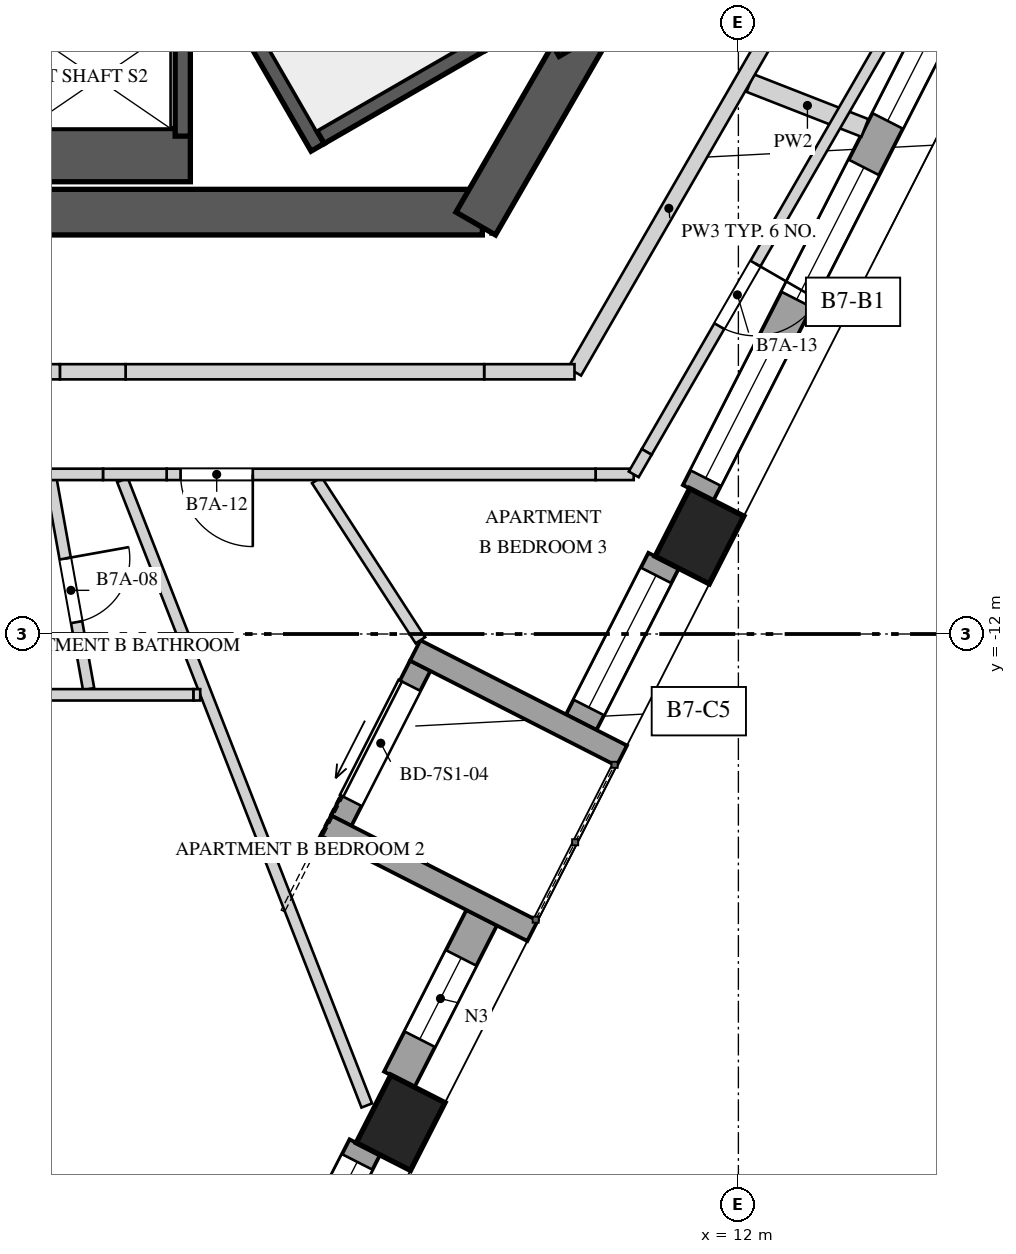
"""IFC4 building model, lengths in metres.
Left out: names, types, materials, properties, quantities, classifications, styles, units other than length and angle.
Written with IfcOpenShell. Run it as: python <this file> out.ifc"""

import sys

from ifc_helpers import new_model, si_unit, direction, frame, frame_2d, origin, origin_2d, place, context, subcontext, project, spatial, rectangle, extrude, element, fill, save


model = new_model("IFC4")
c1 = context("Model", 3, precision=1e-05, world=origin(), true_north=direction((0.0, 1.0)))
c2 = subcontext(c1, "Body", "Model", "MODEL_VIEW")
j1 = project(units=[si_unit("LENGTHUNIT", "METRE"), si_unit("PLANEANGLEUNIT", "RADIAN")], contexts=[c1])
p1 = place(None, origin())
s1 = spatial("IfcSite", under=j1, at=p1, CompositionType="ELEMENT")
p2 = place(p1, origin())
s2 = spatial("IfcBuilding", under=s1, at=p2, CompositionType="ELEMENT")
p3 = place(p2, frame((0.0, 0.0, 274.4)))
s3 = spatial("IfcBuildingStorey", under=s2, at=p3, CompositionType="ELEMENT", Elevation=274.4)
p4 = place(p3, frame((-8.631, -6.45, 0.0), z_axis=(0.0, 0.0, 1.0), x_axis=(1.0, 0.0, 0.0)))
e1 = element("IfcWall", 1, at=p4, inside=s3, PredefinedType="SHEAR", context=c2, shape_type="SweptSolid", body=[
    extrude(rectangle(XDim=17.263, YDim=0.6, at=frame_2d((8.631, 0.0))), origin(), (0.0, 0.0, 1.0), 4.0),
])
p5 = place(p4, frame((6.836, 0.0, 0.0)))
e2 = element("IfcOpeningElement", 2, at=p5, cuts=e1, PredefinedType="OPENING", context=c2, shape_type="SweptSolid", body=[
    extrude(rectangle(XDim=1.0, YDim=2.4, at=frame_2d((0.5, 1.2))), frame((0.0, 0.31, 0.0), z_axis=(0.0, -1.0, 0.0), x_axis=(1.0, 0.0, 0.0)), (0.0, 0.0, 1.0), 0.62),
])
p6 = place(p3, frame((8.545, -6.6, 0.0), z_axis=(0.0, 0.0, 1.0), x_axis=(0.499995765644, 0.866027848477, 0.0)))
e3 = element("IfcWall", 3, at=p6, inside=s3, PredefinedType="SHEAR", context=c2, shape_type="SweptSolid", body=[
    extrude(rectangle(XDim=2.887, YDim=0.6, at=frame_2d((1.443, 0.0))), origin(), (0.0, 0.0, 1.0), 4.0),
])
p7 = place(p3, frame((9.902, -4.25, 0.0), z_axis=(0.0, 0.0, 1.0), x_axis=(-0.499999536116, 0.866025671608, 0.0)))
e4 = element("IfcWall", 4, at=p7, inside=s3, PredefinedType="SHEAR", context=c2, shape_type="SweptSolid", body=[
    extrude(rectangle(XDim=17.263, YDim=0.6, at=frame_2d((8.631, 0.0))), origin(), (0.0, 0.0, 1.0), 4.0),
])
p8 = place(p7, frame((6.906, 0.0, 0.0)))
e5 = element("IfcOpeningElement", 5, at=p8, cuts=e4, PredefinedType="OPENING", context=c2, shape_type="SweptSolid", body=[
    extrude(rectangle(XDim=1.0, YDim=2.4, at=frame_2d((0.5, 1.2))), frame((0.0, 0.31, 0.0), z_axis=(0.0, -1.0, 0.0), x_axis=(1.0, 0.0, 0.0)), (0.0, 0.0, 1.0), 0.62),
])
for number, where, z_axis, x_axis in (
    (6, (7.557, -18.43, -0.35), (0.0, 0.0, 1.0), (0.454, 0.891, 0.0)),
    (7, (11.488, -10.713, -0.35), (0.0, 0.0, 1.0), (0.454, 0.891, 0.0)),
):
    element("IfcColumn", number, at=place(p3, frame(where, z_axis=z_axis, x_axis=x_axis)), inside=s3, PredefinedType="COLUMN", context=c2, shape_type="SweptSolid", body=[
        extrude(rectangle(XDim=1.0, YDim=0.8, at=origin_2d()), origin(), (0.0, 0.0, 1.0), 4.35),
    ])
p9 = place(p3, frame((3.879, -25.041, 0.0), z_axis=(0.0, 0.0, 1.0), x_axis=(0.453992084912, 0.891005716501, 0.0)))
e8 = element("IfcWall", 8, at=p9, inside=s3, PredefinedType="SOLIDWALL", context=c2, shape_type="SweptSolid", body=[
    extrude(rectangle(XDim=7.06, YDim=0.45, at=frame_2d((3.53, 0.0))), origin(), (0.0, 0.0, 1.0), 3.3),
])
p10 = place(p9, frame((0.293, 0.0, 0.4)))
e9 = element("IfcOpeningElement", 9, at=p10, cuts=e8, PredefinedType="OPENING", context=c2, shape_type="SweptSolid", body=[
    extrude(rectangle(XDim=1.2, YDim=2.1, at=frame_2d((0.6, 1.05))), frame((0.0, 0.235, 0.0), z_axis=(0.0, -1.0, 0.0), x_axis=(1.0, 0.0, 0.0)), (0.0, 0.0, 1.0), 0.47),
])
p11 = place(p9, frame((2.255, 0.0, 0.4)))
e10 = element("IfcOpeningElement", 10, at=p11, cuts=e8, PredefinedType="OPENING", context=c2, shape_type="SweptSolid", body=[
    extrude(rectangle(XDim=1.95, YDim=2.75, at=frame_2d((0.975, 1.375))), frame((0.0, 0.235, 0.0), z_axis=(0.0, -1.0, 0.0), x_axis=(1.0, 0.0, 0.0)), (0.0, 0.0, 1.0), 0.47),
])
p12 = place(p9, frame((4.892, 0.0, 0.4)))
e11 = element("IfcOpeningElement", 11, at=p12, cuts=e8, PredefinedType="OPENING", context=c2, shape_type="SweptSolid", body=[
    extrude(rectangle(XDim=1.95, YDim=2.75, at=frame_2d((0.975, 1.375))), frame((0.0, 0.235, 0.0), z_axis=(0.0, -1.0, 0.0), x_axis=(1.0, 0.0, 0.0)), (0.0, 0.0, 1.0), 0.47),
])
p13 = place(p3, frame((7.539, -17.859, 0.0), z_axis=(0.0, 0.0, 1.0), x_axis=(0.454074413722, 0.890963762901, 0.0)))
e12 = element("IfcWall", 12, at=p13, inside=s3, PredefinedType="SOLIDWALL", context=c2, shape_type="SweptSolid", body=[
    extrude(rectangle(XDim=2.387, YDim=0.45, at=frame_2d((1.193, 0.0))), origin(), (0.0, 0.0, 1.0), 3.3),
])
p14 = place(p13, frame((0.593, 0.0, 0.4)))
e13 = element("IfcOpeningElement", 13, at=p14, cuts=e12, PredefinedType="OPENING", context=c2, shape_type="SweptSolid", body=[
    extrude(rectangle(XDim=1.2, YDim=2.75, at=frame_2d((0.6, 1.375))), frame((0.0, 0.235, 0.0), z_axis=(0.0, -1.0, 0.0), x_axis=(1.0, 0.0, 0.0)), (0.0, 0.0, 1.0), 0.47),
])
p15 = place(p3, frame((9.933, -13.161, 0.0), z_axis=(0.0, 0.0, 1.0), x_axis=(0.453993206954, 0.891005144788, 0.0)))
e14 = element("IfcWall", 14, at=p15, inside=s3, PredefinedType="SOLIDWALL", context=c2, shape_type="SweptSolid", body=[
    extrude(rectangle(XDim=2.386, YDim=0.45, at=frame_2d((1.193, 0.0))), origin(), (0.0, 0.0, 1.0), 3.3),
])
p16 = place(p15, frame((0.218, 0.0, 0.4)))
e15 = element("IfcOpeningElement", 15, at=p16, cuts=e14, PredefinedType="OPENING", context=c2, shape_type="SweptSolid", body=[
    extrude(rectangle(XDim=1.95, YDim=2.75, at=frame_2d((0.975, 1.375))), frame((0.0, 0.235, 0.0), z_axis=(0.0, -1.0, 0.0), x_axis=(1.0, 0.0, 0.0)), (0.0, 0.0, 1.0), 0.47),
])
p17 = place(p3, frame((11.47, -10.143, 0.0), z_axis=(0.0, 0.0, 1.0), x_axis=(0.453995484395, 0.891003984362, 0.0)))
e16 = element("IfcWall", 16, at=p17, inside=s3, PredefinedType="SOLIDWALL", context=c2, shape_type="SweptSolid", body=[
    extrude(rectangle(XDim=7.66, YDim=0.45, at=frame_2d((3.83, 0.0))), origin(), (0.0, 0.0, 1.0), 3.3),
])
p18 = place(p17, frame((0.218, 0.0, 0.4)))
e17 = element("IfcOpeningElement", 17, at=p18, cuts=e16, PredefinedType="OPENING", context=c2, shape_type="SweptSolid", body=[
    extrude(rectangle(XDim=1.95, YDim=2.75, at=frame_2d((0.975, 1.375))), frame((0.0, 0.235, 0.0), z_axis=(0.0, -1.0, 0.0), x_axis=(1.0, 0.0, 0.0)), (0.0, 0.0, 1.0), 0.47),
])
p19 = place(p17, frame((2.855, 0.0, 0.4)))
e18 = element("IfcOpeningElement", 18, at=p19, cuts=e16, PredefinedType="OPENING", context=c2, shape_type="SweptSolid", body=[
    extrude(rectangle(XDim=1.95, YDim=2.75, at=frame_2d((0.975, 1.375))), frame((0.0, 0.235, 0.0), z_axis=(0.0, -1.0, 0.0), x_axis=(1.0, 0.0, 0.0)), (0.0, 0.0, 1.0), 0.47),
])
p20 = place(p17, frame((5.492, 0.0, 0.4)))
e19 = element("IfcOpeningElement", 19, at=p20, cuts=e16, PredefinedType="OPENING", context=c2, shape_type="SweptSolid", body=[
    extrude(rectangle(XDim=1.95, YDim=2.75, at=frame_2d((0.975, 1.375))), frame((0.0, 0.235, 0.0), z_axis=(0.0, -1.0, 0.0), x_axis=(1.0, 0.0, 0.0)), (0.0, 0.0, 1.0), 0.47),
])
p21 = place(p3, frame((6.776, -14.455, 0.0), z_axis=(0.0, 0.0, 1.0), x_axis=(0.454076116559, 0.890962895058, 0.0)))
e20 = element("IfcWall", 20, at=p21, inside=s3, PredefinedType="SOLIDWALL", context=c2, shape_type="SweptSolid", body=[
    extrude(rectangle(XDim=2.287, YDim=0.3, at=frame_2d((1.143, 0.0))), origin(), (0.0, 0.0, 1.0), 3.3),
])
p22 = place(p21, frame((0.293, 0.0, 0.0)))
e21 = element("IfcOpeningElement", 21, at=p22, cuts=e20, PredefinedType="OPENING", context=c2, shape_type="SweptSolid", body=[
    extrude(rectangle(XDim=1.7, YDim=2.5, at=frame_2d((0.85, 1.25))), frame((0.0, 0.16, 0.0), z_axis=(0.0, -1.0, 0.0), x_axis=(1.0, 0.0, 0.0)), (0.0, 0.0, 1.0), 0.32),
])
p23 = place(p3, frame((9.292, -15.906, 0.0), z_axis=(0.0, 0.0, 1.0), x_axis=(-0.891023613249, 0.453956959009, 0.0)))
e22 = element("IfcWall", 22, at=p23, inside=s3, PredefinedType="SOLIDWALL", context=c2, shape_type="SweptSolid", body=[
    extrude(rectangle(XDim=3.05, YDim=0.3, at=frame_2d((1.525, 0.0))), origin(), (0.0, 0.0, 1.0), 3.3),
])
p24 = place(p3, frame((10.466, -13.601, 0.0), z_axis=(0.0, 0.0, 1.0), x_axis=(-0.890991233495, 0.454020508165, 0.0)))
e23 = element("IfcWall", 23, at=p24, inside=s3, PredefinedType="SOLIDWALL", context=c2, shape_type="SweptSolid", body=[
    extrude(rectangle(XDim=3.05, YDim=0.3, at=frame_2d((1.525, 0.0))), origin(), (0.0, 0.0, 1.0), 3.3),
])
p25 = place(p3, frame((6.465, -5.597, 0.0), z_axis=(0.0, 0.0, 1.0), x_axis=(-0.49998037582, 0.866036733513, 0.0)))
e24 = element("IfcWall", 24, at=p25, inside=s3, PredefinedType="SOLIDWALL", context=c2, shape_type="SweptSolid", body=[
    extrude(rectangle(XDim=6.2, YDim=0.2, at=frame_2d((3.1, 0.0))), origin(), (0.0, 0.0, 1.0), 3.65),
])
p26 = place(p3, frame((6.501, -5.461, 0.0), z_axis=(0.0, 0.0, 1.0), x_axis=(0.865989465428, 0.500062241894, 0.0)))
e25 = element("IfcWall", 25, at=p26, inside=s3, PredefinedType="SOLIDWALL", context=c2, shape_type="SweptSolid", body=[
    extrude(rectangle(XDim=2.55, YDim=0.2, at=frame_2d((1.275, 0.0))), origin(), (0.0, 0.0, 1.0), 3.65),
])
p27 = place(p3, frame((-0.71, -5.7, 0.0), z_axis=(0.0, 0.0, 1.0), x_axis=(1.0, 0.0, 0.0)))
e26 = element("IfcWall", 26, at=p27, inside=s3, PredefinedType="SOLIDWALL", context=c2, shape_type="SweptSolid", body=[
    extrude(rectangle(XDim=5.5, YDim=0.7, at=frame_2d((2.75, 0.0))), origin(), (0.0, 0.0, 1.0), 3.65),
])
p28 = place(p3, frame((4.69, -3.9, 0.0), z_axis=(0.0, 0.0, 1.0), x_axis=(0.0, -1.0, 0.0)))
e27 = element("IfcWall", 27, at=p28, inside=s3, PredefinedType="SOLIDWALL", context=c2, shape_type="SweptSolid", body=[
    extrude(rectangle(XDim=1.55, YDim=0.2, at=frame_2d((0.775, 0.0))), origin(), (0.0, 0.0, 1.0), 3.65),
])
p29 = place(p3, frame((2.946, -9.905, 0.0), z_axis=(0.0, 0.0, 1.0), x_axis=(0.17664289563, -0.984275005993, 0.0)))
e28 = element("IfcWall", 28, at=p29, inside=s3, PredefinedType="PARTITIONING", context=c2, shape_type="SweptSolid", body=[
    extrude(rectangle(XDim=2.865, YDim=0.15, at=frame_2d((1.433, 0.0))), origin(), (0.0, 0.0, 1.0), 3.65),
])
p30 = place(p29, frame((1.12, 0.0, 0.0)))
e29 = element("IfcOpeningElement", 29, at=p30, cuts=e28, PredefinedType="OPENING", context=c2, shape_type="SweptSolid", body=[
    extrude(rectangle(XDim=0.85, YDim=2.4, at=frame_2d((0.425, 1.2))), frame((0.0, 0.085, 0.0), z_axis=(0.0, -1.0, 0.0), x_axis=(1.0, 0.0, 0.0)), (0.0, 0.0, 1.0), 0.17),
])
p31 = place(p3, frame((3.897, -9.975, 0.0), z_axis=(0.0, 0.0, 1.0), x_axis=(0.363873008582, -0.931448567354, 0.0)))
e30 = element("IfcWall", 30, at=p31, inside=s3, PredefinedType="PARTITIONING", context=c2, shape_type="SweptSolid", body=[
    extrude(rectangle(XDim=8.833, YDim=0.15, at=frame_2d((4.417, 0.0))), origin(), (0.0, 0.0, 1.0), 2.75),
])
p32 = place(p3, frame((4.92, -12.8, 0.0), z_axis=(0.0, 0.0, 1.0), x_axis=(-1.0, 0.0, 0.0)))
e31 = element("IfcWall", 31, at=p32, inside=s3, PredefinedType="PARTITIONING", context=c2, shape_type="SweptSolid", body=[
    extrude(rectangle(XDim=0.09, YDim=0.15, at=frame_2d((0.045, 0.0))), origin(), (0.0, 0.0, 1.0), 2.75),
])
p33 = place(p3, frame((4.83, -12.8, 0.0), z_axis=(0.0, 0.0, 1.0), x_axis=(-1.0, 0.0, 0.0)))
e32 = element("IfcWall", 32, at=p33, inside=s3, PredefinedType="PARTITIONING", context=c2, shape_type="SweptSolid", body=[
    extrude(rectangle(XDim=2.008, YDim=0.15, at=frame_2d((1.004, 0.0))), origin(), (0.0, 0.0, 1.0), 3.65),
])
p34 = place(p3, frame((6.453, -9.975, 0.0), z_axis=(0.0, 0.0, 1.0), x_axis=(0.543154479249, -0.839632783824, 0.0)))
e33 = element("IfcWall", 33, at=p34, inside=s3, PredefinedType="PARTITIONING", context=c2, shape_type="SweptSolid", body=[
    extrude(rectangle(XDim=2.51, YDim=0.15, at=frame_2d((1.255, 0.0))), origin(), (0.0, 0.0, 1.0), 3.65),
])
p35 = place(p3, frame((10.623, -9.9, 0.0), z_axis=(0.0, 0.0, 1.0), x_axis=(-1.0, 0.0, 0.0)))
e34 = element("IfcWall", 34, at=p35, inside=s3, PredefinedType="PARTITIONING", context=c2, shape_type="SweptSolid", body=[
    extrude(rectangle(XDim=0.502, YDim=0.15, at=frame_2d((0.251, 0.0))), origin(), (0.0, 0.0, 1.0), 2.95),
])
p36 = place(p3, frame((10.121, -9.9, 0.0), z_axis=(0.0, 0.0, 1.0), x_axis=(-1.0, 0.0, 0.0)))
e35 = element("IfcWall", 35, at=p36, inside=s3, PredefinedType="PARTITIONING", context=c2, shape_type="SweptSolid", body=[
    extrude(rectangle(XDim=5.643, YDim=0.15, at=frame_2d((2.822, 0.0))), origin(), (0.0, 0.0, 1.0), 3.65),
])
p37 = place(p36, frame((4.51, 0.0, 0.0)))
e36 = element("IfcOpeningElement", 36, at=p37, cuts=e35, PredefinedType="OPENING", context=c2, shape_type="SweptSolid", body=[
    extrude(rectangle(XDim=0.95, YDim=2.4, at=frame_2d((0.475, 1.2))), frame((0.0, 0.085, 0.0), z_axis=(0.0, -1.0, 0.0), x_axis=(1.0, 0.0, 0.0)), (0.0, 0.0, 1.0), 0.17),
])
p38 = place(p3, frame((4.478, -9.9, 0.0), z_axis=(0.0, 0.0, 1.0), x_axis=(-1.0, 0.0, 0.0)))
e37 = element("IfcWall", 37, at=p38, inside=s3, PredefinedType="PARTITIONING", context=c2, shape_type="SweptSolid", body=[
    extrude(rectangle(XDim=0.838, YDim=0.15, at=frame_2d((0.419, 0.0))), origin(), (0.0, 0.0, 1.0), 2.75),
])
p39 = place(p3, frame((3.64, -9.9, 0.0), z_axis=(0.0, 0.0, 1.0), x_axis=(-1.0, 0.0, 0.0)))
e38 = element("IfcWall", 38, at=p39, inside=s3, PredefinedType="PARTITIONING", context=c2, shape_type="SweptSolid", body=[
    extrude(rectangle(XDim=0.691, YDim=0.15, at=frame_2d((0.345, 0.0))), origin(), (0.0, 0.0, 1.0), 3.65),
])
p40 = place(p3, frame((12.153, -4.751, 0.0), z_axis=(0.0, 0.0, 1.0), x_axis=(0.931322658747, -0.364195147283, 0.0)))
e39 = element("IfcWall", 39, at=p40, inside=s3, PredefinedType="SOLIDWALL", context=c2, shape_type="SweptSolid", body=[
    extrude(rectangle(XDim=1.623, YDim=0.25, at=frame_2d((0.812, 0.0))), origin(), (0.0, 0.0, 1.0), 3.65),
])
p41 = place(p3, frame((13.885, -4.25, 0.0), z_axis=(0.0, 0.0, 1.0), x_axis=(-0.500003887042, -0.866023159588, 0.0)))
e40 = element("IfcWall", 40, at=p41, inside=s3, PredefinedType="PARTITIONING", context=c2, shape_type="SweptSolid", body=[
    extrude(rectangle(XDim=6.183, YDim=0.15, at=frame_2d((3.091, 0.0))), origin(), (0.0, 0.0, 1.0), 3.65),
])
p42 = place(p41, frame((3.322, 0.0, 0.0)))
e41 = element("IfcOpeningElement", 41, at=p42, cuts=e40, PredefinedType="OPENING", context=c2, shape_type="SweptSolid", body=[
    extrude(rectangle(XDim=0.95, YDim=2.4, at=frame_2d((0.475, 1.2))), frame((0.0, 0.085, 0.0), z_axis=(0.0, -1.0, 0.0), x_axis=(1.0, 0.0, 0.0)), (0.0, 0.0, 1.0), 0.17),
])
p43 = place(p3, frame((10.794, -9.604, 0.0), z_axis=(0.0, 0.0, 1.0), x_axis=(-0.499908181442, -0.866078408764, 0.0)))
e42 = element("IfcWall", 42, at=p43, inside=s3, PredefinedType="PARTITIONING", context=c2, shape_type="SweptSolid", body=[
    extrude(rectangle(XDim=0.341, YDim=0.15, at=frame_2d((0.171, 0.0))), origin(), (0.0, 0.0, 1.0), 2.95),
])
p44 = place(p3, frame((12.326, -4.25, 0.0), z_axis=(0.0, 0.0, 1.0), x_axis=(-0.50000478328, -0.866022642139, 0.0)))
e43 = element("IfcWall", 43, at=p44, inside=s3, PredefinedType="SOLIDWALL", context=c2, shape_type="SweptSolid", body=[
    extrude(rectangle(XDim=4.965, YDim=0.2, at=frame_2d((2.483, 0.0))), origin(), (0.0, 0.0, 1.0), 3.65),
])
p45 = place(p3, frame((9.844, -8.55, 0.0), z_axis=(0.0, 0.0, 1.0), x_axis=(-1.0, 0.0, 0.0)))
e44 = element("IfcWall", 44, at=p45, inside=s3, PredefinedType="SOLIDWALL", context=c2, shape_type="SweptSolid", body=[
    extrude(rectangle(XDim=1.188, YDim=0.2, at=frame_2d((0.594, 0.0))), origin(), (0.0, 0.0, 1.0), 2.95),
])
p46 = place(p3, frame((8.655, -8.55, 0.0), z_axis=(0.0, 0.0, 1.0), x_axis=(-1.0, 0.0, 0.0)))
e45 = element("IfcWall", 45, at=p46, inside=s3, PredefinedType="SOLIDWALL", context=c2, shape_type="SweptSolid", body=[
    extrude(rectangle(XDim=4.717, YDim=0.2, at=frame_2d((2.359, 0.0))), origin(), (0.0, 0.0, 1.0), 3.65),
])
p47 = place(p3, frame((3.938, -8.55, 0.0), z_axis=(0.0, 0.0, 1.0), x_axis=(-1.0, 0.0, 0.0)))
e46 = element("IfcWall", 46, at=p47, inside=s3, PredefinedType="SOLIDWALL", context=c2, shape_type="SweptSolid", body=[
    extrude(rectangle(XDim=0.865, YDim=0.2, at=frame_2d((0.432, 0.0))), origin(), (0.0, 0.0, 1.0), 2.75),
])
p48 = place(p3, frame((3.073, -8.55, 0.0), z_axis=(0.0, 0.0, 1.0), x_axis=(-1.0, 0.0, 0.0)))
e47 = element("IfcWall", 47, at=p48, inside=s3, PredefinedType="SOLIDWALL", context=c2, shape_type="SweptSolid", body=[
    extrude(rectangle(XDim=0.939, YDim=0.2, at=frame_2d((0.47, 0.0))), origin(), (0.0, 0.0, 1.0), 3.65),
])
p49 = place(p12, origin())
e48 = element("IfcWindow", 48, at=p49, inside=s3, PartitioningType="SINGLE_PANEL", PredefinedType="WINDOW", context=c2, shape_type="SweptSolid", body=[
    extrude(rectangle(XDim=1.95, YDim=2.75, at=frame_2d((0.975, 1.375))), frame((0.0, 0.03, 0.0), z_axis=(0.0, -1.0, 0.0), x_axis=(1.0, 0.0, 0.0)), (0.0, 0.0, 1.0), 0.06),
])
fill(e11, e48)
p50 = place(p14, origin())
e49 = element("IfcWindow", 49, at=p50, inside=s3, PartitioningType="SINGLE_PANEL", PredefinedType="WINDOW", context=c2, shape_type="SweptSolid", body=[
    extrude(rectangle(XDim=1.2, YDim=2.75, at=frame_2d((0.6, 1.375))), frame((0.0, 0.03, 0.0), z_axis=(0.0, -1.0, 0.0), x_axis=(1.0, 0.0, 0.0)), (0.0, 0.0, 1.0), 0.06),
])
fill(e13, e49)
p51 = place(p16, origin())
e50 = element("IfcWindow", 50, at=p51, inside=s3, PartitioningType="SINGLE_PANEL", PredefinedType="WINDOW", context=c2, shape_type="SweptSolid", body=[
    extrude(rectangle(XDim=1.95, YDim=2.75, at=frame_2d((0.975, 1.375))), frame((0.0, 0.03, 0.0), z_axis=(0.0, -1.0, 0.0), x_axis=(1.0, 0.0, 0.0)), (0.0, 0.0, 1.0), 0.06),
])
fill(e15, e50)
p52 = place(p18, origin())
e51 = element("IfcWindow", 51, at=p52, inside=s3, PartitioningType="SINGLE_PANEL", PredefinedType="WINDOW", context=c2, shape_type="SweptSolid", body=[
    extrude(rectangle(XDim=1.95, YDim=2.75, at=frame_2d((0.975, 1.375))), frame((0.0, 0.03, 0.0), z_axis=(0.0, -1.0, 0.0), x_axis=(1.0, 0.0, 0.0)), (0.0, 0.0, 1.0), 0.06),
])
fill(e17, e51)
p53 = place(p19, origin())
e52 = element("IfcWindow", 52, at=p53, inside=s3, PartitioningType="SINGLE_PANEL", PredefinedType="WINDOW", context=c2, shape_type="SweptSolid", body=[
    extrude(rectangle(XDim=1.95, YDim=2.75, at=frame_2d((0.975, 1.375))), frame((0.0, 0.03, 0.0), z_axis=(0.0, -1.0, 0.0), x_axis=(1.0, 0.0, 0.0)), (0.0, 0.0, 1.0), 0.06),
])
fill(e18, e52)
p54 = place(p20, origin())
e53 = element("IfcWindow", 53, at=p54, inside=s3, PartitioningType="SINGLE_PANEL", PredefinedType="WINDOW", context=c2, shape_type="SweptSolid", body=[
    extrude(rectangle(XDim=1.95, YDim=2.75, at=frame_2d((0.975, 1.375))), frame((0.0, 0.03, 0.0), z_axis=(0.0, -1.0, 0.0), x_axis=(1.0, 0.0, 0.0)), (0.0, 0.0, 1.0), 0.06),
])
fill(e19, e53)
p55 = place(p22, origin())
e54 = element("IfcDoor", 54, at=p55, inside=s3, OperationType="SLIDING_TO_LEFT", PredefinedType="DOOR", context=c2, shape_type="SweptSolid", body=[
    extrude(rectangle(XDim=1.7, YDim=2.5, at=frame_2d((0.85, 1.25))), frame((0.0, 0.025, 0.0), z_axis=(0.0, -1.0, 0.0), x_axis=(1.0, 0.0, 0.0)), (0.0, 0.0, 1.0), 0.05),
])
fill(e21, e54)
p56 = place(p30, origin())
e55 = element("IfcDoor", 55, at=p56, inside=s3, OperationType="SINGLE_SWING_RIGHT", PredefinedType="DOOR", context=c2, shape_type="SweptSolid", body=[
    extrude(rectangle(XDim=0.85, YDim=2.4, at=frame_2d((0.425, 1.2))), frame((0.0, 0.025, 0.0), z_axis=(0.0, -1.0, 0.0), x_axis=(1.0, 0.0, 0.0)), (0.0, 0.0, 1.0), 0.05),
])
fill(e29, e55)
p57 = place(p37, origin())
e56 = element("IfcDoor", 56, at=p57, inside=s3, OperationType="SINGLE_SWING_RIGHT", PredefinedType="DOOR", context=c2, shape_type="SweptSolid", body=[
    extrude(rectangle(XDim=0.95, YDim=2.4, at=frame_2d((0.475, 1.2))), frame((0.0, 0.025, 0.0), z_axis=(0.0, -1.0, 0.0), x_axis=(1.0, 0.0, 0.0)), (0.0, 0.0, 1.0), 0.05),
])
fill(e36, e56)
p58 = place(p42, origin())
e57 = element("IfcDoor", 57, at=p58, inside=s3, OperationType="SINGLE_SWING_LEFT", PredefinedType="DOOR", context=c2, shape_type="SweptSolid", body=[
    extrude(rectangle(XDim=0.95, YDim=2.4, at=frame_2d((0.475, 1.2))), frame((0.0, 0.025, 0.0), z_axis=(0.0, -1.0, 0.0), x_axis=(1.0, 0.0, 0.0)), (0.0, 0.0, 1.0), 0.05),
])
fill(e41, e57)
save(model, sys.argv[1])
